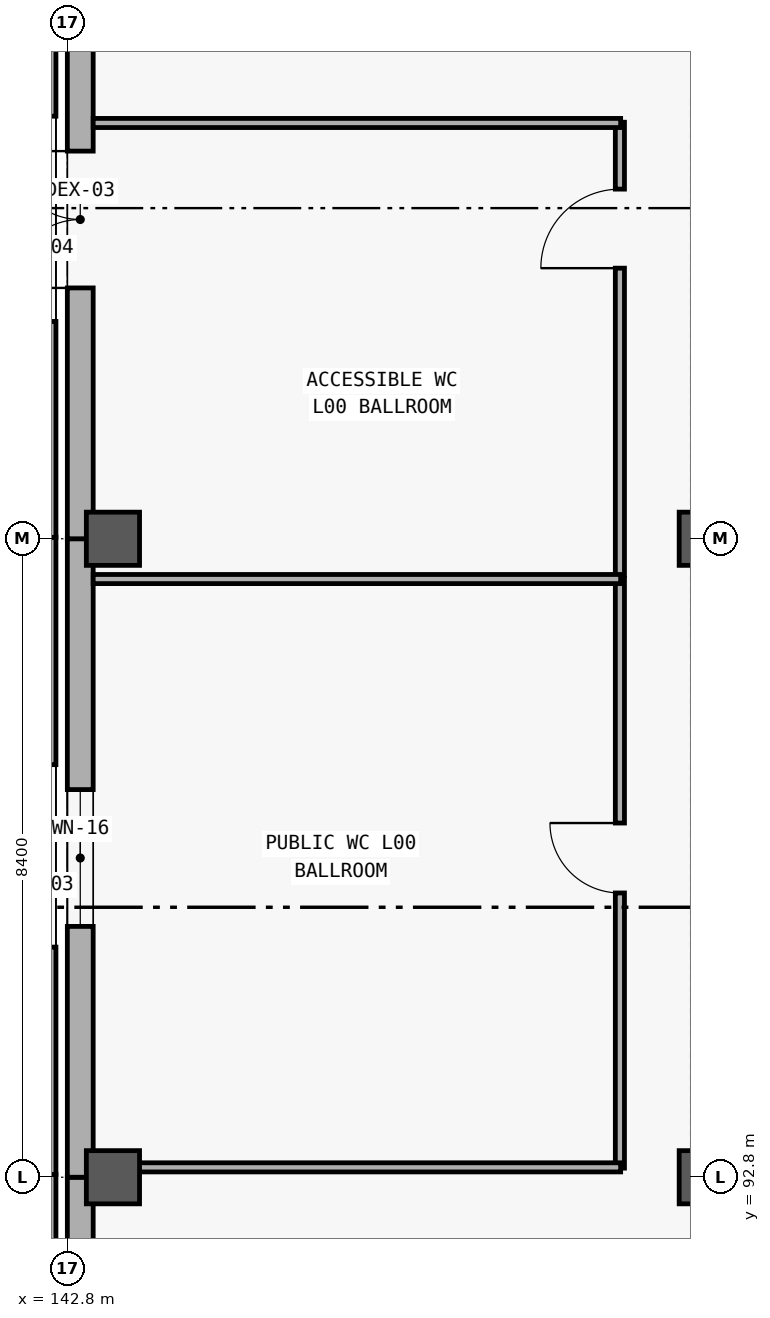
"""IFC4 building model, lengths in metres.
Left out: names, types, materials, properties, quantities, classifications, styles, units other than length and angle.
Written with IfcOpenShell. Run it as: python <this file> out.ifc"""

import sys

from ifc_helpers import new_model, si_unit, direction, frame, frame_2d, origin, origin_2d, place, context, subcontext, project, spatial, rectangle, extrude, element, fill, save


model = new_model("IFC4")
c1 = context("Model", 3, precision=1e-05, world=origin(), true_north=direction((0.0, 1.0)))
c2 = subcontext(c1, "Body", "Model", "MODEL_VIEW")
j1 = project(units=[si_unit("LENGTHUNIT", "METRE"), si_unit("PLANEANGLEUNIT", "RADIAN")], contexts=[c1])
p1 = place(None, origin())
s1 = spatial("IfcSite", under=j1, at=p1, CompositionType="ELEMENT")
p2 = place(p1, origin())
s2 = spatial("IfcBuilding", under=s1, at=p2, CompositionType="ELEMENT")
p3 = place(p2, origin())
s3 = spatial("IfcBuildingStorey", under=s2, at=p3, CompositionType="ELEMENT", Elevation=0.0)
for number, where, z_axis, x_axis in (
    (1, (143.4, 92.8, 0.0), (0.0, 0.0, 1.0), (1.0, 0.0, 0.0)),
    (2, (143.4, 101.2, 0.0), (0.0, 0.0, 1.0), (1.0, 0.0, 0.0)),
    (3, (151.2, 92.8, 0.0), (0.0, 0.0, 1.0), (1.0, 0.0, 0.0)),
    (4, (151.2, 101.2, 0.0), (0.0, 0.0, 1.0), (1.0, 0.0, 0.0)),
):
    element("IfcColumn", number, at=place(p3, frame(where, z_axis=z_axis, x_axis=x_axis)), inside=s3, PredefinedType="COLUMN", context=c2, shape_type="SweptSolid", body=[
        extrude(rectangle(XDim=0.7, YDim=0.7, at=origin_2d()), origin(), (0.0, 0.0, 1.0), 5.4),
    ])
p4 = place(p3, frame((142.97, 84.4, 0.0), z_axis=(0.0, 0.0, 1.0), x_axis=(0.0, 1.0, 0.0)))
e5 = element("IfcWall", 5, at=p4, inside=s3, PredefinedType="SOLIDWALL", context=c2, shape_type="SweptSolid", body=[
    extrude(rectangle(XDim=8.4, YDim=0.34, at=frame_2d((4.2, 0.0))), origin(), (0.0, 0.0, 1.0), 5.08),
])
p5 = place(p4, frame((3.5, 0.0, 0.9)))
e6 = element("IfcOpeningElement", 6, at=p5, cuts=e5, PredefinedType="OPENING", context=c2, shape_type="SweptSolid", body=[
    extrude(rectangle(XDim=1.4, YDim=1.6, at=frame_2d((0.7, 0.8))), frame((0.0, 0.18, 0.0), z_axis=(0.0, -1.0, 0.0), x_axis=(1.0, 0.0, 0.0)), (0.0, 0.0, 1.0), 0.36),
])
p6 = place(p3, frame((142.97, 92.8, 0.0), z_axis=(0.0, 0.0, 1.0), x_axis=(0.0, 1.0, 0.0)))
e7 = element("IfcWall", 7, at=p6, inside=s3, PredefinedType="SOLIDWALL", context=c2, shape_type="SweptSolid", body=[
    extrude(rectangle(XDim=8.4, YDim=0.34, at=frame_2d((4.2, 0.0))), origin(), (0.0, 0.0, 1.0), 5.08),
])
p7 = place(p6, frame((3.3, 0.0, 0.9)))
e8 = element("IfcOpeningElement", 8, at=p7, cuts=e7, PredefinedType="OPENING", context=c2, shape_type="SweptSolid", body=[
    extrude(rectangle(XDim=1.8, YDim=1.6, at=frame_2d((0.9, 0.8))), frame((0.0, 0.18, 0.0), z_axis=(0.0, -1.0, 0.0), x_axis=(1.0, 0.0, 0.0)), (0.0, 0.0, 1.0), 0.36),
])
p8 = place(p3, frame((142.97, 101.2, 0.0), z_axis=(0.0, 0.0, 1.0), x_axis=(0.0, 1.0, 0.0)))
e9 = element("IfcWall", 9, at=p8, inside=s3, PredefinedType="SOLIDWALL", context=c2, shape_type="SweptSolid", body=[
    extrude(rectangle(XDim=8.4, YDim=0.34, at=frame_2d((4.2, 0.0))), origin(), (0.0, 0.0, 1.0), 5.08),
])
p9 = place(p8, frame((3.3, 0.0, 0.0)))
e10 = element("IfcOpeningElement", 10, at=p9, cuts=e9, PredefinedType="OPENING", context=c2, shape_type="SweptSolid", body=[
    extrude(rectangle(XDim=1.8, YDim=2.4, at=frame_2d((0.9, 1.2))), frame((0.0, 0.18, 0.0), z_axis=(0.0, -1.0, 0.0), x_axis=(1.0, 0.0, 0.0)), (0.0, 0.0, 1.0), 0.36),
])
p10 = place(p3, frame((142.5, 92.837, 0.0), z_axis=(0.0, 0.0, 1.0), x_axis=(0.0, -1.0, 0.0)))
e11 = element("IfcWall", 11, at=p10, inside=s3, PredefinedType="SOLIDWALL", context=c2, shape_type="SweptSolid", body=[
    extrude(rectangle(XDim=8.381, YDim=0.3, at=frame_2d((4.19, 0.0))), origin(), (0.0, 0.0, 1.0), 5.1),
])
p11 = place(p10, frame((3.141, 0.0, 0.9)))
e12 = element("IfcOpeningElement", 12, at=p11, cuts=e11, PredefinedType="OPENING", context=c2, shape_type="SweptSolid", body=[
    extrude(rectangle(XDim=2.1, YDim=1.8, at=frame_2d((1.05, 0.9))), frame((0.0, 0.16, 0.0), z_axis=(0.0, -1.0, 0.0), x_axis=(1.0, 0.0, 0.0)), (0.0, 0.0, 1.0), 0.32),
])
p12 = place(p3, frame((142.5, 101.219, 0.0), z_axis=(0.0, 0.0, 1.0), x_axis=(0.0, -1.0, 0.0)))
e13 = element("IfcWall", 13, at=p12, inside=s3, PredefinedType="SOLIDWALL", context=c2, shape_type="SweptSolid", body=[
    extrude(rectangle(XDim=8.382, YDim=0.3, at=frame_2d((4.191, 0.0))), origin(), (0.0, 0.0, 1.0), 5.1),
])
p13 = place(p12, frame((2.991, 0.0, 0.9)))
e14 = element("IfcOpeningElement", 14, at=p13, cuts=e13, PredefinedType="OPENING", context=c2, shape_type="SweptSolid", body=[
    extrude(rectangle(XDim=2.4, YDim=1.8, at=frame_2d((1.2, 0.9))), frame((0.0, 0.16, 0.0), z_axis=(0.0, -1.0, 0.0), x_axis=(1.0, 0.0, 0.0)), (0.0, 0.0, 1.0), 0.32),
])
p14 = place(p3, frame((142.5, 109.6, 0.0), z_axis=(0.0, 0.0, 1.0), x_axis=(0.0, -1.0, 0.0)))
e15 = element("IfcWall", 15, at=p14, inside=s3, PredefinedType="SOLIDWALL", context=c2, shape_type="SweptSolid", body=[
    extrude(rectangle(XDim=8.381, YDim=0.3, at=frame_2d((4.19, 0.0))), origin(), (0.0, 0.0, 1.0), 5.1),
])
p15 = place(p14, frame((2.841, 0.0, 0.9)))
e16 = element("IfcOpeningElement", 16, at=p15, cuts=e15, PredefinedType="OPENING", context=c2, shape_type="SweptSolid", body=[
    extrude(rectangle(XDim=2.7, YDim=1.85, at=frame_2d((1.35, 0.925))), frame((0.0, 0.16, 0.0), z_axis=(0.0, -1.0, 0.0), x_axis=(1.0, 0.0, 0.0)), (0.0, 0.0, 1.0), 0.32),
])
p16 = place(p3, frame((150.07, 92.92, 0.0), z_axis=(0.0, 0.0, 1.0), x_axis=(0.0, 1.0, 0.0)))
e17 = element("IfcWall", 17, at=p16, inside=s3, PredefinedType="PARTITIONING", context=c2, shape_type="SweptSolid", body=[
    extrude(rectangle(XDim=7.76, YDim=0.12, at=frame_2d((3.88, 0.0))), origin(), (0.0, 0.0, 1.0), 4.18),
])
p17 = place(p16, frame((3.62, 0.0, 0.0)))
e18 = element("IfcOpeningElement", 18, at=p17, cuts=e17, PredefinedType="OPENING", context=c2, shape_type="SweptSolid", body=[
    extrude(rectangle(XDim=0.92, YDim=2.15, at=frame_2d((0.46, 1.075))), frame((0.0, 0.07, 0.0), z_axis=(0.0, -1.0, 0.0), x_axis=(1.0, 0.0, 0.0)), (0.0, 0.0, 1.0), 0.14),
])
p18 = place(p3, frame((150.07, 100.72, 0.0), z_axis=(0.0, 0.0, 1.0), x_axis=(0.0, 1.0, 0.0)))
e19 = element("IfcWall", 19, at=p18, inside=s3, PredefinedType="PARTITIONING", context=c2, shape_type="SweptSolid", body=[
    extrude(rectangle(XDim=5.96, YDim=0.12, at=frame_2d((2.98, 0.0))), origin(), (0.0, 0.0, 1.0), 4.18),
])
p19 = place(p18, frame((4.04, 0.0, 0.0)))
e20 = element("IfcOpeningElement", 20, at=p19, cuts=e19, PredefinedType="OPENING", context=c2, shape_type="SweptSolid", body=[
    extrude(rectangle(XDim=1.04, YDim=2.15, at=frame_2d((0.52, 1.075))), frame((0.0, 0.07, 0.0), z_axis=(0.0, -1.0, 0.0), x_axis=(1.0, 0.0, 0.0)), (0.0, 0.0, 1.0), 0.14),
])
for number, where, z_axis, x_axis in (
    (21, (143.14, 92.93, 0.0), (0.0, 0.0, 1.0), (1.0, 0.0, 0.0)),
    (22, (143.14, 100.67, 0.0), (0.0, 0.0, 1.0), (1.0, 0.0, 0.0)),
    (23, (143.14, 106.67, 0.0), (0.0, 0.0, 1.0), (1.0, 0.0, 0.0)),
):
    element("IfcWall", number, at=place(p3, frame(where, z_axis=z_axis, x_axis=x_axis)), inside=s3, PredefinedType="PARTITIONING", context=c2, shape_type="SweptSolid", body=[
        extrude(rectangle(XDim=6.94, YDim=0.12, at=frame_2d((3.47, 0.0))), origin(), (0.0, 0.0, 1.0), 4.18),
    ])
p20 = place(p7, origin())
e24 = element("IfcWindow", 24, at=p20, inside=s3, PartitioningType="SINGLE_PANEL", PredefinedType="WINDOW", context=c2, shape_type="SweptSolid", body=[
    extrude(rectangle(XDim=1.8, YDim=1.6, at=frame_2d((0.9, 0.8))), frame((0.0, 0.03, 0.0), z_axis=(0.0, -1.0, 0.0), x_axis=(1.0, 0.0, 0.0)), (0.0, 0.0, 1.0), 0.06),
])
fill(e8, e24)
p21 = place(p9, origin())
e25 = element("IfcDoor", 25, at=p21, inside=s3, OperationType="DOUBLE_DOOR_SINGLE_SWING", PredefinedType="DOOR", context=c2, shape_type="SweptSolid", body=[
    extrude(rectangle(XDim=1.8, YDim=2.4, at=frame_2d((0.9, 1.2))), frame((0.0, 0.025, 0.0), z_axis=(0.0, -1.0, 0.0), x_axis=(1.0, 0.0, 0.0)), (0.0, 0.0, 1.0), 0.05),
])
fill(e10, e25)
p22 = place(p17, origin())
e26 = element("IfcDoor", 26, at=p22, inside=s3, OperationType="SINGLE_SWING_RIGHT", PredefinedType="DOOR", context=c2, shape_type="SweptSolid", body=[
    extrude(rectangle(XDim=0.92, YDim=2.15, at=frame_2d((0.46, 1.075))), frame((0.0, 0.025, 0.0), z_axis=(0.0, -1.0, 0.0), x_axis=(1.0, 0.0, 0.0)), (0.0, 0.0, 1.0), 0.05),
])
fill(e18, e26)
p23 = place(p19, origin())
e27 = element("IfcDoor", 27, at=p23, inside=s3, OperationType="SINGLE_SWING_LEFT", PredefinedType="DOOR", context=c2, shape_type="SweptSolid", body=[
    extrude(rectangle(XDim=1.04, YDim=2.15, at=frame_2d((0.52, 1.075))), frame((0.0, 0.025, 0.0), z_axis=(0.0, -1.0, 0.0), x_axis=(1.0, 0.0, 0.0)), (0.0, 0.0, 1.0), 0.05),
])
fill(e20, e27)
save(model, sys.argv[1])
